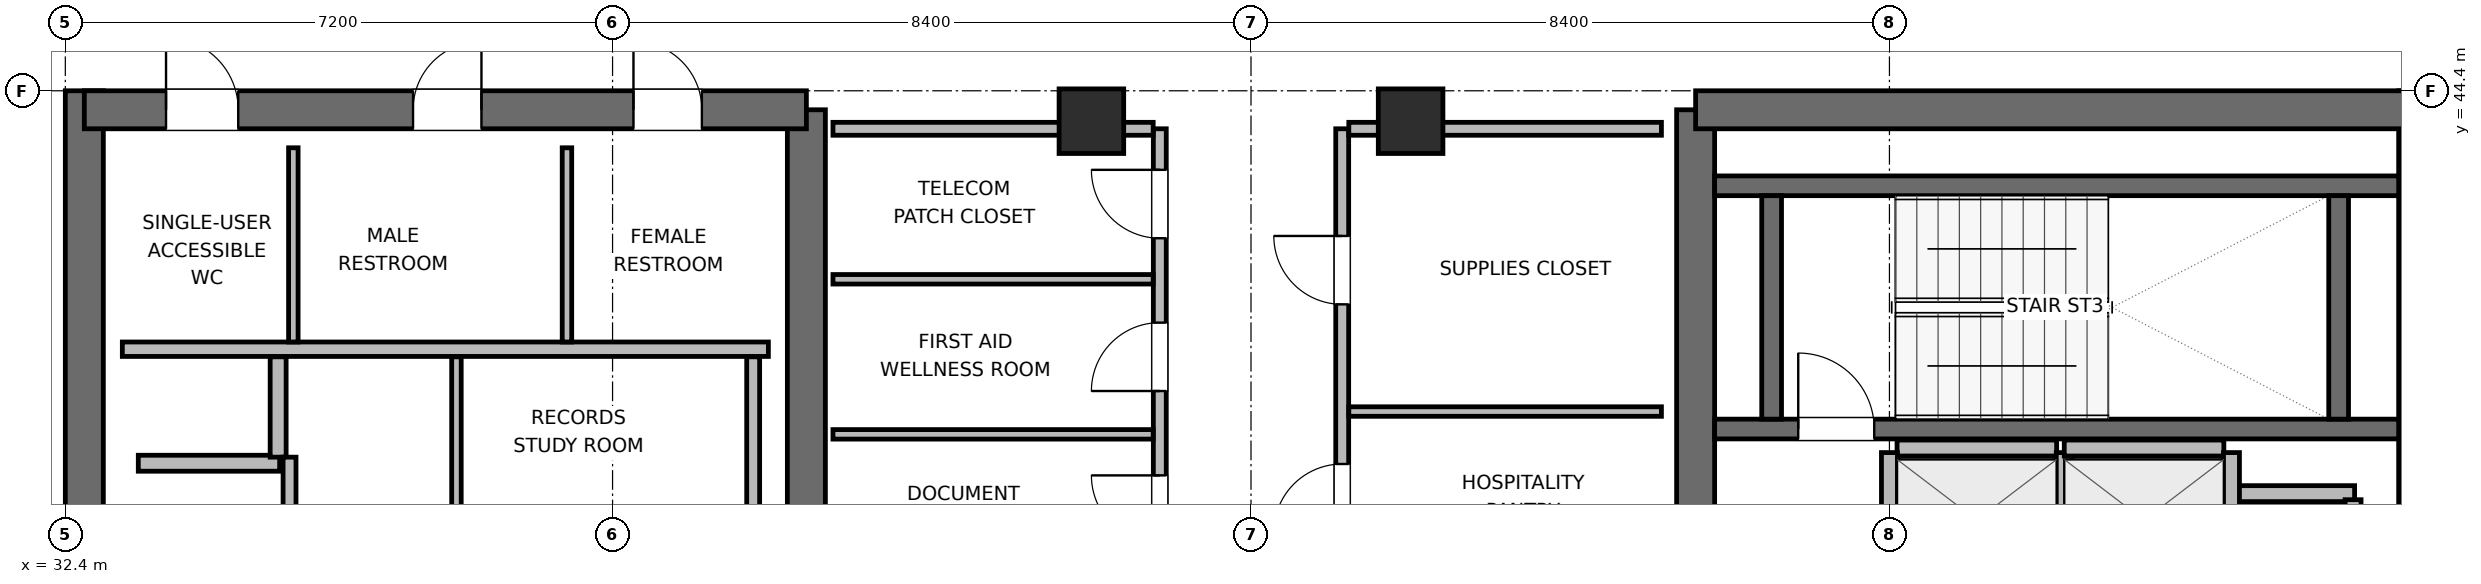
"""IFC4 building model, lengths in metres.
Left out: names, types, materials, properties, quantities, classifications, styles, units other than length and angle.
Written with IfcOpenShell. Run it as: python <this file> out.ifc"""

import sys

from ifc_helpers import new_model, si_unit, direction, frame, frame_2d, origin, origin_2d, place, context, subcontext, project, spatial, rectangle, extrude, element, fill, save


model = new_model("IFC4")
c1 = context("Model", 3, precision=1e-05, world=origin(), true_north=direction((0.0, 1.0)))
c2 = subcontext(c1, "Body", "Model", "MODEL_VIEW")
j1 = project(units=[si_unit("LENGTHUNIT", "METRE"), si_unit("PLANEANGLEUNIT", "RADIAN")], contexts=[c1])
p1 = place(None, origin())
s1 = spatial("IfcSite", under=j1, at=p1, CompositionType="ELEMENT")
p2 = place(p1, origin())
s2 = spatial("IfcBuilding", under=s1, at=p2, CompositionType="ELEMENT")
p3 = place(p2, frame((0.0, 0.0, 270.6)))
s3 = spatial("IfcBuildingStorey", under=s2, at=p3, CompositionType="ELEMENT", Elevation=270.6)
p4 = place(p3, frame((32.65, 27.6, 0.0), z_axis=(0.0, 0.0, 1.0), x_axis=(0.0, 1.0, 0.0)))
e1 = element("IfcWall", 1, at=p4, inside=s3, PredefinedType="SHEAR", context=c2, shape_type="SweptSolid", body=[
    extrude(rectangle(XDim=16.8, YDim=0.5, at=frame_2d((8.4, 0.0))), origin(), (0.0, 0.0, 1.0), 3.9),
])
p5 = place(p3, frame((42.15, 37.8, 0.0), z_axis=(0.0, 0.0, 1.0), x_axis=(0.0, 1.0, 0.0)))
e2 = element("IfcWall", 2, at=p5, inside=s3, PredefinedType="SHEAR", context=c2, shape_type="SweptSolid", body=[
    extrude(rectangle(XDim=6.35, YDim=0.5, at=frame_2d((3.175, 0.0))), origin(), (0.0, 0.0, 1.0), 3.9),
])
p6 = place(p3, frame((32.65, 44.15, 0.0), z_axis=(0.0, 0.0, 1.0), x_axis=(1.0, 0.0, 0.0)))
e3 = element("IfcWall", 3, at=p6, inside=s3, PredefinedType="SHEAR", context=c2, shape_type="SweptSolid", body=[
    extrude(rectangle(XDim=9.5, YDim=0.5, at=frame_2d((4.75, 0.0))), origin(), (0.0, 0.0, 1.0), 3.9),
])
p7 = place(p6, frame((1.075, 0.0, 0.0)))
e4 = element("IfcOpeningElement", 4, at=p7, cuts=e3, PredefinedType="OPENING", context=c2, shape_type="SweptSolid", body=[
    extrude(rectangle(XDim=0.95, YDim=2.04, at=frame_2d((0.475, 1.02))), frame((0.0, 0.26, 0.0), z_axis=(0.0, -1.0, 0.0), x_axis=(1.0, 0.0, 0.0)), (0.0, 0.0, 1.0), 0.52),
])
p8 = place(p6, frame((4.325, 0.0, 0.0)))
e5 = element("IfcOpeningElement", 5, at=p8, cuts=e3, PredefinedType="OPENING", context=c2, shape_type="SweptSolid", body=[
    extrude(rectangle(XDim=0.9, YDim=2.02, at=frame_2d((0.45, 1.01))), frame((0.0, 0.26, 0.0), z_axis=(0.0, -1.0, 0.0), x_axis=(1.0, 0.0, 0.0)), (0.0, 0.0, 1.0), 0.52),
])
p9 = place(p6, frame((7.225, 0.0, 0.0)))
e6 = element("IfcOpeningElement", 6, at=p9, cuts=e3, PredefinedType="OPENING", context=c2, shape_type="SweptSolid", body=[
    extrude(rectangle(XDim=0.9, YDim=2.02, at=frame_2d((0.45, 1.01))), frame((0.0, 0.26, 0.0), z_axis=(0.0, -1.0, 0.0), x_axis=(1.0, 0.0, 0.0)), (0.0, 0.0, 1.0), 0.52),
])
p10 = place(p3, frame((53.85, 38.0, 0.0), z_axis=(0.0, 0.0, 1.0), x_axis=(0.0, 1.0, 0.0)))
e7 = element("IfcWall", 7, at=p10, inside=s3, PredefinedType="SHEAR", context=c2, shape_type="SweptSolid", body=[
    extrude(rectangle(XDim=6.15, YDim=0.5, at=frame_2d((3.075, 0.0))), origin(), (0.0, 0.0, 1.0), 3.9),
])
p11 = place(p3, frame((63.35, 27.6, 0.0), z_axis=(0.0, 0.0, 1.0), x_axis=(0.0, 1.0, 0.0)))
e8 = element("IfcWall", 8, at=p11, inside=s3, PredefinedType="SHEAR", context=c2, shape_type="SweptSolid", body=[
    extrude(rectangle(XDim=16.8, YDim=0.5, at=frame_2d((8.4, 0.0))), origin(), (0.0, 0.0, 1.0), 3.9),
])
p12 = place(p3, frame((53.85, 44.15, 0.0), z_axis=(0.0, 0.0, 1.0), x_axis=(1.0, 0.0, 0.0)))
e9 = element("IfcWall", 9, at=p12, inside=s3, PredefinedType="SHEAR", context=c2, shape_type="SweptSolid", body=[
    extrude(rectangle(XDim=9.5, YDim=0.5, at=frame_2d((4.75, 0.0))), origin(), (0.0, 0.0, 1.0), 3.9),
])
p13 = place(p3, frame((54.1, 39.95, 0.0), z_axis=(0.0, 0.0, 1.0), x_axis=(1.0, 0.0, 0.0)))
e10 = element("IfcWall", 10, at=p13, inside=s3, PredefinedType="SHEAR", context=c2, shape_type="SweptSolid", body=[
    extrude(rectangle(XDim=9.0, YDim=0.26, at=frame_2d((4.5, 0.0))), origin(), (0.0, 0.0, 1.0), 3.9),
])
p14 = place(p13, frame((1.1, 0.0, 0.0)))
e11 = element("IfcOpeningElement", 11, at=p14, cuts=e10, PredefinedType="OPENING", context=c2, shape_type="SweptSolid", body=[
    extrude(rectangle(XDim=1.0, YDim=2.04, at=frame_2d((0.5, 1.02))), frame((0.0, 0.14, 0.0), z_axis=(0.0, -1.0, 0.0), x_axis=(1.0, 0.0, 0.0)), (0.0, 0.0, 1.0), 0.28),
])
p15 = place(p3, frame((54.1, 43.15, 0.0), z_axis=(0.0, 0.0, 1.0), x_axis=(1.0, 0.0, 0.0)))
e12 = element("IfcWall", 12, at=p15, inside=s3, PredefinedType="SHEAR", context=c2, shape_type="SweptSolid", body=[
    extrude(rectangle(XDim=9.0, YDim=0.26, at=frame_2d((4.5, 0.0))), origin(), (0.0, 0.0, 1.0), 3.9),
])
for number, where, z_axis, x_axis in (
    (13, (54.85, 40.08, 0.0), (0.0, 0.0, 1.0), (0.0, 1.0, 0.0)),
    (14, (62.31, 40.08, 0.0), (0.0, 0.0, 1.0), (0.0, 1.0, 0.0)),
):
    element("IfcWall", number, at=place(p3, frame(where, z_axis=z_axis, x_axis=x_axis)), inside=s3, PredefinedType="SHEAR", context=c2, shape_type="SweptSolid", body=[
        extrude(rectangle(XDim=2.94, YDim=0.26, at=frame_2d((1.47, 0.0))), origin(), (0.0, 0.0, 1.0), 3.9),
    ])
for number, where, z_axis, x_axis in (
    (15, (45.9, 44.0, 0.0), (0.0, 0.0, 1.0), (1.0, 0.0, 0.0)),
    (16, (50.1, 44.0, 0.0), (0.0, 0.0, 1.0), (1.0, 0.0, 0.0)),
):
    element("IfcColumn", number, at=place(p3, frame(where, z_axis=z_axis, x_axis=x_axis)), inside=s3, PredefinedType="COLUMN", context=c2, shape_type="SweptSolid", body=[
        extrude(rectangle(XDim=0.85, YDim=0.85, at=origin_2d()), origin(), (0.0, 0.0, 1.0), 3.9),
    ])
p16 = place(p3, frame((33.15, 41.0, 0.0), z_axis=(0.0, 0.0, 1.0), x_axis=(1.0, 0.0, 0.0)))
e17 = element("IfcWall", 17, at=p16, inside=s3, PredefinedType="PLUMBINGWALL", context=c2, shape_type="SweptSolid", body=[
    extrude(rectangle(XDim=8.5, YDim=0.19, at=frame_2d((4.25, 0.0))), origin(), (0.0, 0.0, 1.0), 3.68),
])
for number, where, z_axis, x_axis in (
    (18, (35.4, 41.095, 0.0), (0.0, 0.0, 1.0), (0.0, 1.0, 0.0)),
    (19, (39.0, 41.095, 0.0), (0.0, 0.0, 1.0), (0.0, 1.0, 0.0)),
):
    element("IfcWall", number, at=place(p3, frame(where, z_axis=z_axis, x_axis=x_axis)), inside=s3, PredefinedType="PARTITIONING", context=c2, shape_type="SweptSolid", body=[
        extrude(rectangle(XDim=2.555, YDim=0.125, at=frame_2d((1.277, 0.0))), origin(), (0.0, 0.0, 1.0), 3.68),
    ])
p17 = place(p3, frame((33.36, 39.5, 0.0), z_axis=(0.0, 0.0, 1.0), x_axis=(1.0, 0.0, 0.0)))
e20 = element("IfcWall", 20, at=p17, inside=s3, PredefinedType="PARTITIONING", context=c2, shape_type="SweptSolid", body=[
    extrude(rectangle(XDim=1.86, YDim=0.21, at=frame_2d((0.93, 0.0))), origin(), (0.0, 0.0, 1.0), 3.68),
])
p18 = place(p3, frame((35.2, 39.58, 0.0), z_axis=(0.0, 0.0, 1.0), x_axis=(0.0, 1.0, 0.0)))
e21 = element("IfcWall", 21, at=p18, inside=s3, PredefinedType="PARTITIONING", context=c2, shape_type="SweptSolid", body=[
    extrude(rectangle(XDim=1.32, YDim=0.21, at=frame_2d((0.66, 0.0))), origin(), (0.0, 0.0, 1.0), 3.68),
])
p19 = place(p3, frame((60.72, 39.1, 0.0), z_axis=(0.0, 0.0, 1.0), x_axis=(1.0, 0.0, 0.0)))
e22 = element("IfcWall", 22, at=p19, inside=s3, PredefinedType="PARTITIONING", context=c2, shape_type="SweptSolid", body=[
    extrude(rectangle(XDim=1.8, YDim=0.21, at=frame_2d((0.9, 0.0))), origin(), (0.0, 0.0, 1.0), 3.68),
])
p20 = place(p3, frame((60.7, 37.02, 0.0), z_axis=(0.0, 0.0, 1.0), x_axis=(0.0, 1.0, 0.0)))
e23 = element("IfcWall", 23, at=p20, inside=s3, PredefinedType="PARTITIONING", context=c2, shape_type="SweptSolid", body=[
    extrude(rectangle(XDim=1.96, YDim=0.21, at=frame_2d((0.98, 0.0))), origin(), (0.0, 0.0, 1.0), 3.68),
])
p21 = place(p3, frame((62.5, 36.98, 0.0), z_axis=(0.0, 0.0, 1.0), x_axis=(0.0, 1.0, 0.0)))
e24 = element("IfcWall", 24, at=p21, inside=s3, PredefinedType="PARTITIONING", context=c2, shape_type="SweptSolid", body=[
    extrude(rectangle(XDim=2.04, YDim=0.21, at=frame_2d((1.02, 0.0))), origin(), (0.0, 0.0, 1.0), 3.68),
])
p22 = place(p3, frame((56.5, 39.7, 0.0), z_axis=(0.0, 0.0, 1.0), x_axis=(1.0, 0.0, 0.0)))
e25 = element("IfcWall", 25, at=p22, inside=s3, PredefinedType="PARTITIONING", context=c2, shape_type="SweptSolid", body=[
    extrude(rectangle(XDim=2.1, YDim=0.21, at=frame_2d((1.05, 0.0))), origin(), (0.0, 0.0, 1.0), 3.68),
])
for number, where, z_axis, x_axis in (
    (26, (56.4, 37.86, 0.0), (0.0, 0.0, 1.0), (0.0, 1.0, 0.0)),
    (27, (58.7, 37.86, 0.0), (0.0, 0.0, 1.0), (0.0, 1.0, 0.0)),
):
    element("IfcWall", number, at=place(p3, frame(where, z_axis=z_axis, x_axis=x_axis)), inside=s3, PredefinedType="PARTITIONING", context=c2, shape_type="SweptSolid", body=[
        extrude(rectangle(XDim=1.78, YDim=0.21, at=frame_2d((0.89, 0.0))), origin(), (0.0, 0.0, 1.0), 3.68),
    ])
p23 = place(p3, frame((58.7, 39.7, 0.0), z_axis=(0.0, 0.0, 1.0), x_axis=(1.0, 0.0, 0.0)))
e28 = element("IfcWall", 28, at=p23, inside=s3, PredefinedType="PARTITIONING", context=c2, shape_type="SweptSolid", body=[
    extrude(rectangle(XDim=2.1, YDim=0.21, at=frame_2d((1.05, 0.0))), origin(), (0.0, 0.0, 1.0), 3.68),
])
p24 = place(p3, frame((60.9, 37.86, 0.0), z_axis=(0.0, 0.0, 1.0), x_axis=(0.0, 1.0, 0.0)))
e29 = element("IfcWall", 29, at=p24, inside=s3, PredefinedType="PARTITIONING", context=c2, shape_type="SweptSolid", body=[
    extrude(rectangle(XDim=1.78, YDim=0.21, at=frame_2d((0.89, 0.0))), origin(), (0.0, 0.0, 1.0), 3.68),
])
p25 = place(p3, frame((35.35, 38.087, 0.0), z_axis=(0.0, 0.0, 1.0), x_axis=(0.0, 1.0, 0.0)))
e30 = element("IfcWall", 30, at=p25, inside=s3, PredefinedType="PARTITIONING", context=c2, shape_type="SweptSolid", body=[
    extrude(rectangle(XDim=1.493, YDim=0.17, at=frame_2d((0.747, 0.0))), origin(), (0.0, 0.0, 1.0), 3.68),
])
p26 = place(p3, frame((41.45, 38.087, 0.0), z_axis=(0.0, 0.0, 1.0), x_axis=(0.0, 1.0, 0.0)))
e31 = element("IfcWall", 31, at=p26, inside=s3, PredefinedType="PARTITIONING", context=c2, shape_type="SweptSolid", body=[
    extrude(rectangle(XDim=2.813, YDim=0.17, at=frame_2d((1.406, 0.0))), origin(), (0.0, 0.0, 1.0), 3.68),
])
p27 = place(p3, frame((37.546, 38.087, 0.0), z_axis=(0.0, 0.0, 1.0), x_axis=(0.0, 1.0, 0.0)))
e32 = element("IfcWall", 32, at=p27, inside=s3, PredefinedType="PARTITIONING", context=c2, shape_type="SweptSolid", body=[
    extrude(rectangle(XDim=2.813, YDim=0.125, at=frame_2d((1.406, 0.0))), origin(), (0.0, 0.0, 1.0), 3.68),
])
p28 = place(p3, frame((46.8, 37.9, 0.0), z_axis=(0.0, 0.0, 1.0), x_axis=(0.0, 1.0, 0.0)))
e33 = element("IfcWall", 33, at=p28, inside=s3, PredefinedType="PARTITIONING", context=c2, shape_type="SweptSolid", body=[
    extrude(rectangle(XDim=6.0, YDim=0.17, at=frame_2d((3.0, 0.0))), origin(), (0.0, 0.0, 1.0), 3.68),
])
p29 = place(p28, frame((0.54, 0.0, 0.0)))
e34 = element("IfcOpeningElement", 34, at=p29, cuts=e33, PredefinedType="OPENING", context=c2, shape_type="SweptSolid", body=[
    extrude(rectangle(XDim=0.9, YDim=2.02, at=frame_2d((0.45, 1.01))), frame((0.0, 0.095, 0.0), z_axis=(0.0, -1.0, 0.0), x_axis=(1.0, 0.0, 0.0)), (0.0, 0.0, 1.0), 0.19),
])
p30 = place(p28, frame((2.55, 0.0, 0.0)))
e35 = element("IfcOpeningElement", 35, at=p30, cuts=e33, PredefinedType="OPENING", context=c2, shape_type="SweptSolid", body=[
    extrude(rectangle(XDim=0.9, YDim=2.02, at=frame_2d((0.45, 1.01))), frame((0.0, 0.095, 0.0), z_axis=(0.0, -1.0, 0.0), x_axis=(1.0, 0.0, 0.0)), (0.0, 0.0, 1.0), 0.19),
])
p31 = place(p28, frame((4.56, 0.0, 0.0)))
e36 = element("IfcOpeningElement", 36, at=p31, cuts=e33, PredefinedType="OPENING", context=c2, shape_type="SweptSolid", body=[
    extrude(rectangle(XDim=0.9, YDim=2.02, at=frame_2d((0.45, 1.01))), frame((0.0, 0.095, 0.0), z_axis=(0.0, -1.0, 0.0), x_axis=(1.0, 0.0, 0.0)), (0.0, 0.0, 1.0), 0.19),
])
p32 = place(p3, frame((42.5, 43.9, 0.0), z_axis=(0.0, 0.0, 1.0), x_axis=(1.0, 0.0, 0.0)))
e37 = element("IfcWall", 37, at=p32, inside=s3, PredefinedType="PARTITIONING", context=c2, shape_type="SweptSolid", body=[
    extrude(rectangle(XDim=4.213, YDim=0.17, at=frame_2d((2.106, 0.0))), origin(), (0.0, 0.0, 1.0), 2.765),
])
for number, where, z_axis, x_axis in (
    (38, (42.5, 39.88, 0.0), (0.0, 0.0, 1.0), (1.0, 0.0, 0.0)),
    (39, (42.5, 41.92, 0.0), (0.0, 0.0, 1.0), (1.0, 0.0, 0.0)),
):
    element("IfcWall", number, at=place(p3, frame(where, z_axis=z_axis, x_axis=x_axis)), inside=s3, PredefinedType="PARTITIONING", context=c2, shape_type="SweptSolid", body=[
        extrude(rectangle(XDim=4.213, YDim=0.125, at=frame_2d((2.106, 0.0))), origin(), (0.0, 0.0, 1.0), 3.68),
    ])
p33 = place(p3, frame((49.2, 37.9, 0.0), z_axis=(0.0, 0.0, 1.0), x_axis=(0.0, 1.0, 0.0)))
e40 = element("IfcWall", 40, at=p33, inside=s3, PredefinedType="PARTITIONING", context=c2, shape_type="SweptSolid", body=[
    extrude(rectangle(XDim=6.0, YDim=0.17, at=frame_2d((3.0, 0.0))), origin(), (0.0, 0.0, 1.0), 3.68),
])
p34 = place(p33, frame((0.69, 0.0, 0.0)))
e41 = element("IfcOpeningElement", 41, at=p34, cuts=e40, PredefinedType="OPENING", context=c2, shape_type="SweptSolid", body=[
    extrude(rectangle(XDim=0.9, YDim=2.02, at=frame_2d((0.45, 1.01))), frame((0.0, 0.095, 0.0), z_axis=(0.0, -1.0, 0.0), x_axis=(1.0, 0.0, 0.0)), (0.0, 0.0, 1.0), 0.19),
])
p35 = place(p33, frame((3.69, 0.0, 0.0)))
e42 = element("IfcOpeningElement", 42, at=p35, cuts=e40, PredefinedType="OPENING", context=c2, shape_type="SweptSolid", body=[
    extrude(rectangle(XDim=0.9, YDim=2.02, at=frame_2d((0.45, 1.01))), frame((0.0, 0.095, 0.0), z_axis=(0.0, -1.0, 0.0), x_axis=(1.0, 0.0, 0.0)), (0.0, 0.0, 1.0), 0.19),
])
p36 = place(p3, frame((49.287, 43.9, 0.0), z_axis=(0.0, 0.0, 1.0), x_axis=(1.0, 0.0, 0.0)))
e43 = element("IfcWall", 43, at=p36, inside=s3, PredefinedType="PARTITIONING", context=c2, shape_type="SweptSolid", body=[
    extrude(rectangle(XDim=4.113, YDim=0.17, at=frame_2d((2.056, 0.0))), origin(), (0.0, 0.0, 1.0), 2.765),
])
p37 = place(p3, frame((49.287, 40.18, 0.0), z_axis=(0.0, 0.0, 1.0), x_axis=(1.0, 0.0, 0.0)))
e44 = element("IfcWall", 44, at=p37, inside=s3, PredefinedType="PARTITIONING", context=c2, shape_type="SweptSolid", body=[
    extrude(rectangle(XDim=4.113, YDim=0.125, at=frame_2d((2.056, 0.0))), origin(), (0.0, 0.0, 1.0), 3.68),
])
p38 = place(p14, origin())
e45 = element("IfcDoor", 45, at=p38, inside=s3, OperationType="SINGLE_SWING_LEFT", PredefinedType="DOOR", context=c2, shape_type="SweptSolid", body=[
    extrude(rectangle(XDim=1.0, YDim=2.04, at=frame_2d((0.5, 1.02))), frame((0.0, 0.025, 0.0), z_axis=(0.0, -1.0, 0.0), x_axis=(1.0, 0.0, 0.0)), (0.0, 0.0, 1.0), 0.05),
])
fill(e11, e45)
p39 = place(p7, origin())
e46 = element("IfcDoor", 46, at=p39, inside=s3, OperationType="SINGLE_SWING_LEFT", PredefinedType="DOOR", context=c2, shape_type="SweptSolid", body=[
    extrude(rectangle(XDim=0.95, YDim=2.04, at=frame_2d((0.475, 1.02))), frame((0.0, 0.025, 0.0), z_axis=(0.0, -1.0, 0.0), x_axis=(1.0, 0.0, 0.0)), (0.0, 0.0, 1.0), 0.05),
])
fill(e4, e46)
p40 = place(p8, origin())
e47 = element("IfcDoor", 47, at=p40, inside=s3, OperationType="SINGLE_SWING_RIGHT", PredefinedType="DOOR", context=c2, shape_type="SweptSolid", body=[
    extrude(rectangle(XDim=0.9, YDim=2.02, at=frame_2d((0.45, 1.01))), frame((0.0, 0.025, 0.0), z_axis=(0.0, -1.0, 0.0), x_axis=(1.0, 0.0, 0.0)), (0.0, 0.0, 1.0), 0.05),
])
fill(e5, e47)
p41 = place(p9, origin())
e48 = element("IfcDoor", 48, at=p41, inside=s3, OperationType="SINGLE_SWING_LEFT", PredefinedType="DOOR", context=c2, shape_type="SweptSolid", body=[
    extrude(rectangle(XDim=0.9, YDim=2.02, at=frame_2d((0.45, 1.01))), frame((0.0, 0.025, 0.0), z_axis=(0.0, -1.0, 0.0), x_axis=(1.0, 0.0, 0.0)), (0.0, 0.0, 1.0), 0.05),
])
fill(e6, e48)
p42 = place(p29, origin())
e49 = element("IfcDoor", 49, at=p42, inside=s3, OperationType="SINGLE_SWING_RIGHT", PredefinedType="DOOR", context=c2, shape_type="SweptSolid", body=[
    extrude(rectangle(XDim=0.9, YDim=2.02, at=frame_2d((0.45, 1.01))), frame((0.0, 0.025, 0.0), z_axis=(0.0, -1.0, 0.0), x_axis=(1.0, 0.0, 0.0)), (0.0, 0.0, 1.0), 0.05),
])
fill(e34, e49)
p43 = place(p30, origin())
e50 = element("IfcDoor", 50, at=p43, inside=s3, OperationType="SINGLE_SWING_LEFT", PredefinedType="DOOR", context=c2, shape_type="SweptSolid", body=[
    extrude(rectangle(XDim=0.9, YDim=2.02, at=frame_2d((0.45, 1.01))), frame((0.0, 0.025, 0.0), z_axis=(0.0, -1.0, 0.0), x_axis=(1.0, 0.0, 0.0)), (0.0, 0.0, 1.0), 0.05),
])
fill(e35, e50)
p44 = place(p31, origin())
e51 = element("IfcDoor", 51, at=p44, inside=s3, OperationType="SINGLE_SWING_RIGHT", PredefinedType="DOOR", context=c2, shape_type="SweptSolid", body=[
    extrude(rectangle(XDim=0.9, YDim=2.02, at=frame_2d((0.45, 1.01))), frame((0.0, 0.025, 0.0), z_axis=(0.0, -1.0, 0.0), x_axis=(1.0, 0.0, 0.0)), (0.0, 0.0, 1.0), 0.05),
])
fill(e36, e51)
p45 = place(p34, origin())
e52 = element("IfcDoor", 52, at=p45, inside=s3, OperationType="SINGLE_SWING_LEFT", PredefinedType="DOOR", context=c2, shape_type="SweptSolid", body=[
    extrude(rectangle(XDim=0.9, YDim=2.02, at=frame_2d((0.45, 1.01))), frame((0.0, 0.025, 0.0), z_axis=(0.0, -1.0, 0.0), x_axis=(1.0, 0.0, 0.0)), (0.0, 0.0, 1.0), 0.05),
])
fill(e41, e52)
p46 = place(p35, origin())
e53 = element("IfcDoor", 53, at=p46, inside=s3, OperationType="SINGLE_SWING_RIGHT", PredefinedType="DOOR", context=c2, shape_type="SweptSolid", body=[
    extrude(rectangle(XDim=0.9, YDim=2.02, at=frame_2d((0.45, 1.01))), frame((0.0, 0.025, 0.0), z_axis=(0.0, -1.0, 0.0), x_axis=(1.0, 0.0, 0.0)), (0.0, 0.0, 1.0), 0.05),
])
fill(e42, e53)
save(model, sys.argv[1])
